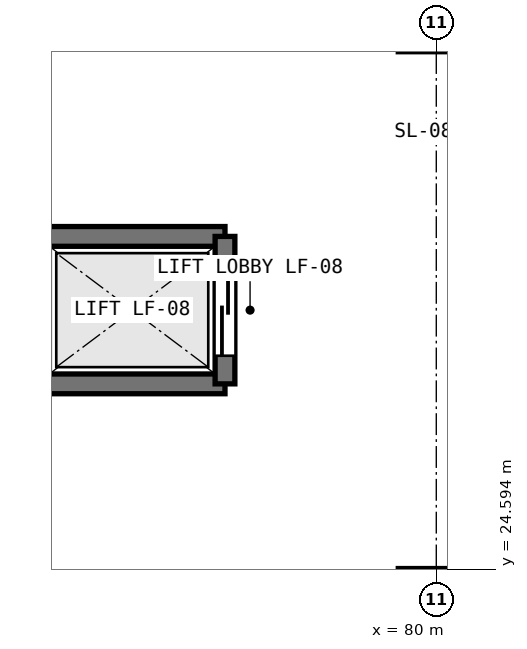
"""IFC4 building model, lengths in metres.
Left out: names, types, materials, properties, quantities, classifications, styles, units other than length and angle.
Written with IfcOpenShell. Run it as: python <this file> out.ifc"""

import sys

from ifc_helpers import new_model, si_unit, direction, frame, frame_2d, origin, place, context, subcontext, project, spatial, rectangle, extrude, element, fill, save


model = new_model("IFC4")
c1 = context("Model", 3, precision=1e-05, world=origin(), true_north=direction((0.0, 1.0)))
c2 = subcontext(c1, "Body", "Model", "MODEL_VIEW")
j1 = project(units=[si_unit("LENGTHUNIT", "METRE"), si_unit("PLANEANGLEUNIT", "RADIAN")], contexts=[c1])
p1 = place(None, origin())
s1 = spatial("IfcSite", under=j1, at=p1, CompositionType="ELEMENT")
p2 = place(p1, origin())
s2 = spatial("IfcBuilding", under=s1, at=p2, CompositionType="ELEMENT")
p3 = place(p2, frame((0.0, 0.0, 24.6)))
s3 = spatial("IfcBuildingStorey", under=s2, at=p3, CompositionType="ELEMENT", Elevation=24.6)
for number, where, z_axis, x_axis in (
    (1, (74.78, 28.97, 0.0), (0.0, 0.0, 1.0), (1.0, 0.0, 0.0)),
    (2, (77.22, 27.03, 0.0), (0.0, 0.0, 1.0), (-1.0, 0.0, 0.0)),
):
    element("IfcWall", number, at=place(p3, frame(where, z_axis=z_axis, x_axis=x_axis)), inside=s3, PredefinedType="SHEAR", context=c2, shape_type="SweptSolid", body=[
        extrude(rectangle(XDim=2.44, YDim=0.26, at=frame_2d((1.22, 0.0))), origin(), (0.0, 0.0, 1.0), 4.55),
    ])
p4 = place(p3, frame((77.22, 28.97, 0.0), z_axis=(0.0, 0.0, 1.0), x_axis=(0.0, -1.0, 0.0)))
e3 = element("IfcWall", 3, at=p4, inside=s3, PredefinedType="SHEAR", context=c2, shape_type="SweptSolid", body=[
    extrude(rectangle(XDim=1.94, YDim=0.26, at=frame_2d((0.97, 0.0))), origin(), (0.0, 0.0, 1.0), 4.55),
])
p5 = place(p4, frame((0.37, 0.0, 0.0)))
e4 = element("IfcOpeningElement", 4, at=p5, cuts=e3, PredefinedType="OPENING", context=c2, shape_type="SweptSolid", body=[
    extrude(rectangle(XDim=1.2, YDim=2.15, at=frame_2d((0.6, 1.075))), frame((0.0, 0.14, 0.0), z_axis=(0.0, -1.0, 0.0), x_axis=(1.0, 0.0, 0.0)), (0.0, 0.0, 1.0), 0.28),
])
p6 = place(p5, origin())
e5 = element("IfcDoor", 5, at=p6, inside=s3, OperationType="SLIDING_TO_LEFT", PredefinedType="DOOR", context=c2, shape_type="SweptSolid", body=[
    extrude(rectangle(XDim=1.2, YDim=2.15, at=frame_2d((0.6, 1.075))), frame((0.0, 0.025, 0.0), z_axis=(0.0, -1.0, 0.0), x_axis=(1.0, 0.0, 0.0)), (0.0, 0.0, 1.0), 0.05),
])
fill(e4, e5)
save(model, sys.argv[1])
